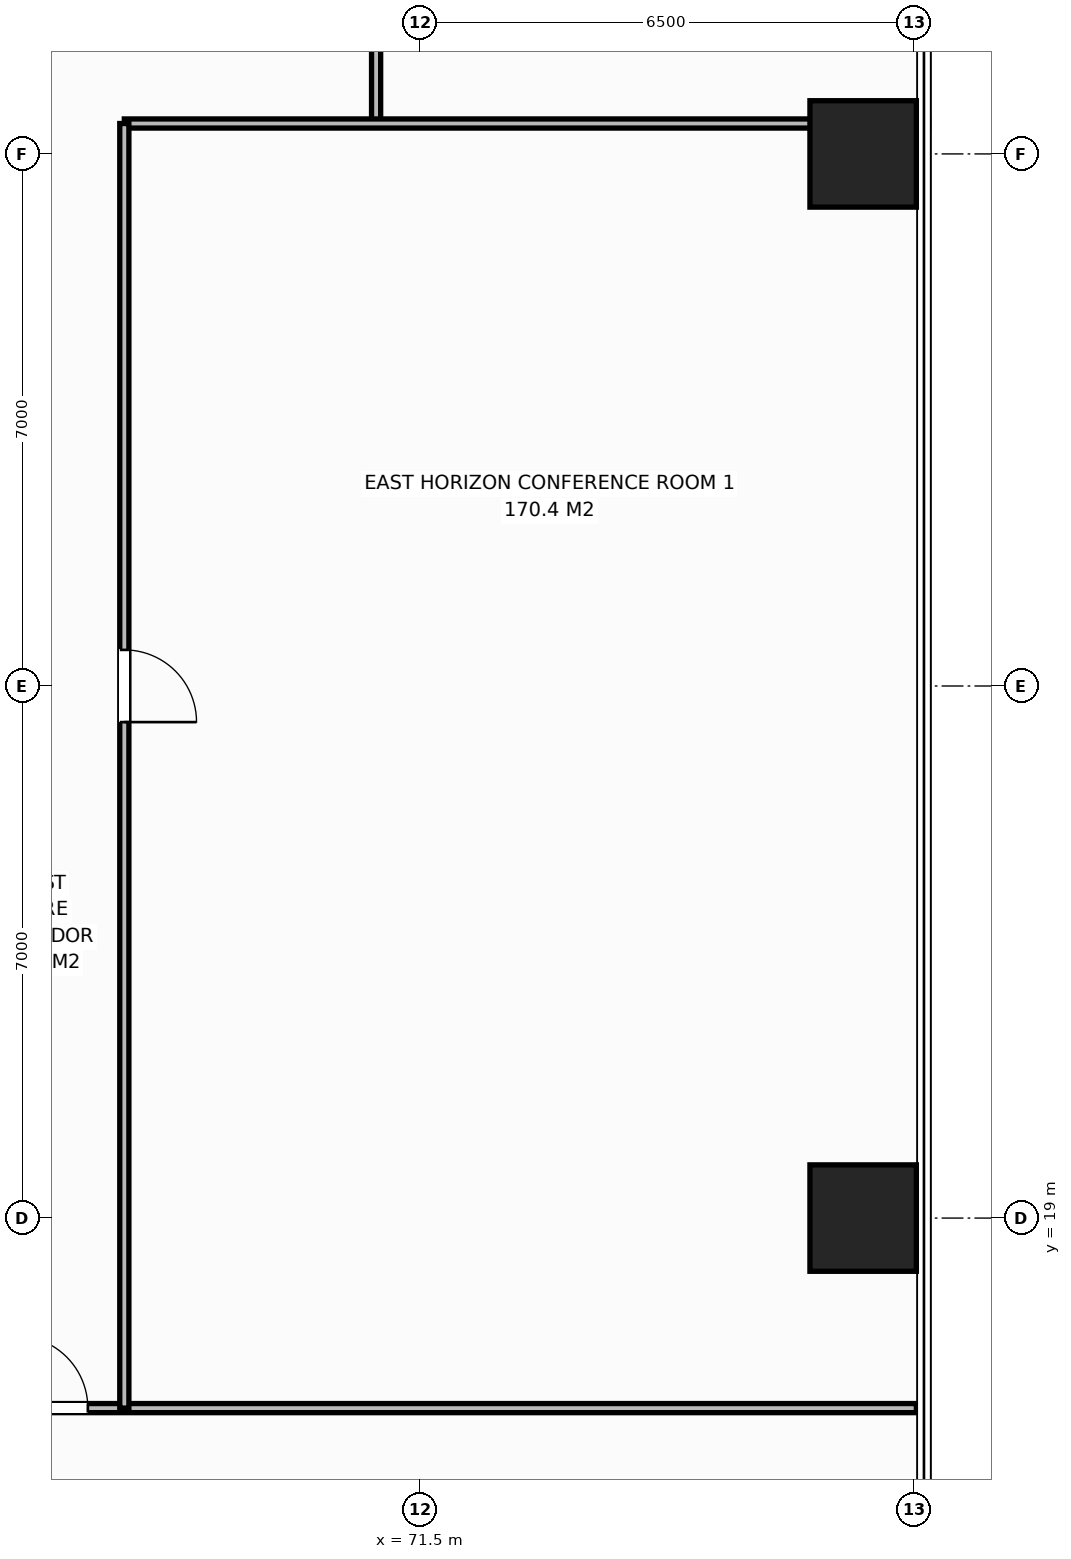
"""IFC4 building model, lengths in metres.
Left out: names, types, materials, properties, quantities, classifications, styles, units other than length and angle.
Written with IfcOpenShell. Run it as: python <this file> out.ifc"""

import sys

from ifc_helpers import new_model, si_unit, direction, frame, frame_2d, origin, origin_2d, place, context, subcontext, project, spatial, rectangle, extrude, element, fill, save


model = new_model("IFC4")
c1 = context("Model", 3, precision=1e-05, world=origin(), true_north=direction((0.0, 1.0)))
c2 = subcontext(c1, "Body", "Model", "MODEL_VIEW")
j1 = project(units=[si_unit("LENGTHUNIT", "METRE"), si_unit("PLANEANGLEUNIT", "RADIAN")], contexts=[c1])
p1 = place(None, origin())
s1 = spatial("IfcSite", under=j1, at=p1, CompositionType="ELEMENT")
p2 = place(p1, origin())
s2 = spatial("IfcBuilding", under=s1, at=p2, CompositionType="ELEMENT")
p3 = place(p2, frame((0.0, 0.0, 73.4)))
s3 = spatial("IfcBuildingStorey", under=s2, at=p3, CompositionType="ELEMENT", Elevation=73.4)
for number, where, z_axis, x_axis in (
    (1, (77.32, 19.0, 0.0), (0.0, 0.0, 1.0), (1.0, 0.0, 0.0)),
    (2, (77.32, 33.0, 0.0), (0.0, 0.0, 1.0), (1.0, 0.0, 0.0)),
):
    element("IfcColumn", number, at=place(p3, frame(where, z_axis=z_axis, x_axis=x_axis)), inside=s3, PredefinedType="COLUMN", context=c2, shape_type="SweptSolid", body=[
        extrude(rectangle(XDim=1.4, YDim=1.4, at=origin_2d()), origin(), (0.0, 0.0, 1.0), 3.8),
    ])
p4 = place(p3, frame((70.912, 33.4, 0.0), z_axis=(0.0, 0.0, 1.0), x_axis=(0.0, 1.0, 0.0)))
e3 = element("IfcWall", 3, at=p4, inside=s3, PredefinedType="PARTITIONING", context=c2, shape_type="SweptSolid", body=[
    extrude(rectangle(XDim=2.1, YDim=0.12, at=frame_2d((1.05, 0.0))), origin(), (0.0, 0.0, 1.0), 3.55),
])
p5 = place(p3, frame((64.29, 16.5, 0.0), z_axis=(0.0, 0.0, 1.0), x_axis=(1.0, 0.0, 0.0)))
e4 = element("IfcWall", 4, at=p5, inside=s3, PredefinedType="PARTITIONING", context=c2, shape_type="SweptSolid", body=[
    extrude(rectangle(XDim=13.73, YDim=0.12, at=frame_2d((6.865, 0.0))), origin(), (0.0, 0.0, 1.0), 3.55),
])
p6 = place(p5, frame((1.88, 0.0, 0.0)))
e5 = element("IfcOpeningElement", 5, at=p6, cuts=e4, PredefinedType="OPENING", context=c2, shape_type="SweptSolid", body=[
    extrude(rectangle(XDim=0.95, YDim=2.15, at=frame_2d((0.475, 1.075))), frame((0.0, 0.07, 0.0), z_axis=(0.0, -1.0, 0.0), x_axis=(1.0, 0.0, 0.0)), (0.0, 0.0, 1.0), 0.14),
])
p7 = place(p3, frame((67.6, 33.4, 0.0), z_axis=(0.0, 0.0, 1.0), x_axis=(1.0, 0.0, 0.0)))
e6 = element("IfcWall", 6, at=p7, inside=s3, PredefinedType="PARTITIONING", context=c2, shape_type="SweptSolid", body=[
    extrude(rectangle(XDim=10.58, YDim=0.12, at=frame_2d((5.29, 0.0))), origin(), (0.0, 0.0, 1.0), 3.55),
])
p8 = place(p3, frame((67.6, 16.5, 0.0), z_axis=(0.0, 0.0, 1.0), x_axis=(0.0, 1.0, 0.0)))
e7 = element("IfcWall", 7, at=p8, inside=s3, PredefinedType="PARTITIONING", context=c2, shape_type="SweptSolid", body=[
    extrude(rectangle(XDim=16.9, YDim=0.12, at=frame_2d((8.45, 0.0))), origin(), (0.0, 0.0, 1.0), 3.55),
])
p9 = place(p8, frame((9.025, 0.0, 0.0)))
e8 = element("IfcOpeningElement", 8, at=p9, cuts=e7, PredefinedType="OPENING", context=c2, shape_type="SweptSolid", body=[
    extrude(rectangle(XDim=0.95, YDim=2.15, at=frame_2d((0.475, 1.075))), frame((0.0, 0.07, 0.0), z_axis=(0.0, -1.0, 0.0), x_axis=(1.0, 0.0, 0.0)), (0.0, 0.0, 1.0), 0.14),
])
p10 = place(p6, origin())
e9 = element("IfcDoor", 9, at=p10, inside=s3, OperationType="SINGLE_SWING_LEFT", PredefinedType="DOOR", context=c2, shape_type="SweptSolid", body=[
    extrude(rectangle(XDim=0.95, YDim=2.15, at=frame_2d((0.475, 1.075))), frame((0.0, 0.025, 0.0), z_axis=(0.0, -1.0, 0.0), x_axis=(1.0, 0.0, 0.0)), (0.0, 0.0, 1.0), 0.05),
])
fill(e5, e9)
p11 = place(p9, origin())
e10 = element("IfcDoor", 10, at=p11, inside=s3, OperationType="SINGLE_SWING_RIGHT", PredefinedType="DOOR", context=c2, shape_type="SweptSolid", body=[
    extrude(rectangle(XDim=0.95, YDim=2.15, at=frame_2d((0.475, 1.075))), frame((0.0, 0.025, 0.0), z_axis=(0.0, -1.0, 0.0), x_axis=(1.0, 0.0, 0.0)), (0.0, 0.0, 1.0), 0.05),
])
fill(e8, e10)
save(model, sys.argv[1])
